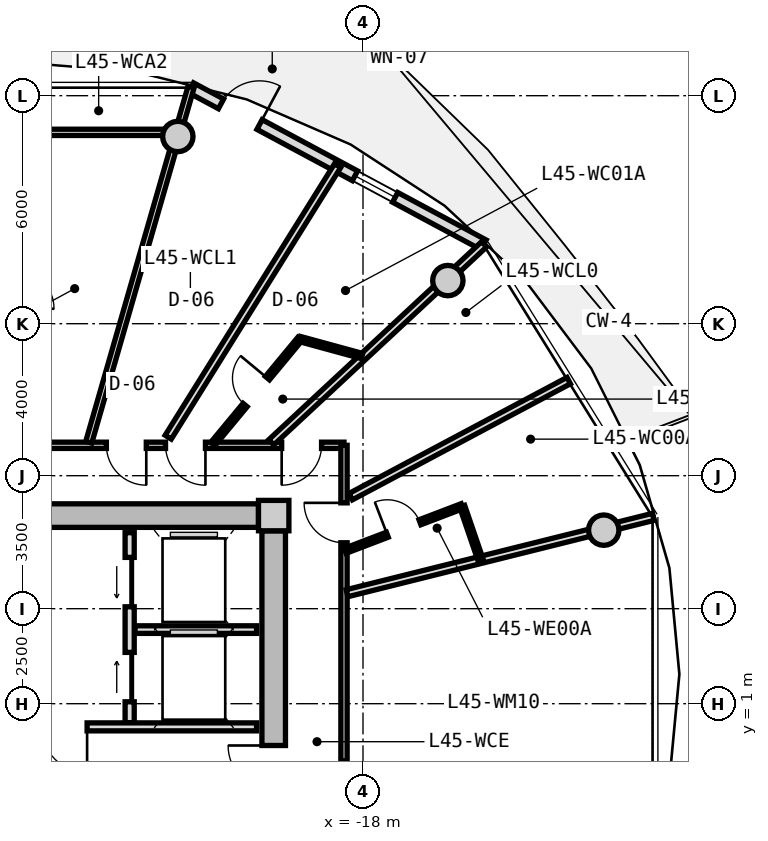
"""IFC4 building model, lengths in metres.
Left out: names, types, materials, properties, quantities, classifications, styles, units other than length and angle.
Written with IfcOpenShell. Run it as: python <this file> out.ifc"""

import sys

from ifc_helpers import new_model, si_unit, direction, frame, frame_2d, origin, origin_2d, place, context, subcontext, project, spatial, rectangle, circle, extrude, source, transform, mapped, element, fill, save


model = new_model("IFC4")
c1 = context("Model", 3, precision=1e-05, world=origin(), true_north=direction((0.0, 1.0)))
c2 = subcontext(c1, "Body", "Model", "MODEL_VIEW")
j1 = project(units=[si_unit("LENGTHUNIT", "METRE"), si_unit("PLANEANGLEUNIT", "RADIAN")], contexts=[c1])
p1 = place(None, origin())
s1 = spatial("IfcSite", under=j1, at=p1, CompositionType="ELEMENT")
p2 = place(p1, origin())
s2 = spatial("IfcBuilding", under=s1, at=p2, CompositionType="ELEMENT")
p3 = place(p2, frame((0.0, 0.0, 146.5)))
s3 = spatial("IfcBuildingStorey", under=s2, at=p3, CompositionType="ELEMENT", Elevation=146.5)
m1 = source(origin(), c2, "Body", "SweptSolid", [
    extrude(rectangle(XDim=0.8, YDim=0.8, at=origin_2d()), origin(), (0.0, 0.0, 1.0), 3.05),
])
p4 = place(p3, frame((-20.35, 5.95, 0.0), z_axis=(0.0, 0.0, 1.0), x_axis=(1.0, 0.0, 0.0)))
e1 = element("IfcColumn", 1, at=p4, inside=s3, PredefinedType="COLUMN", context=c2, shape_type="MappedRepresentation", body=[
    mapped(m1, transform((0.0, 0.0, 0.0), x_axis=(1.0, 0.0, 0.0), y_axis=(0.0, 1.0, 0.0), z_axis=(0.0, 0.0, 1.0), scale=1.0)),
])
m2 = source(origin(), c2, "Body", "SweptSolid", [
    extrude(rectangle(XDim=14.5, YDim=0.62, at=frame_2d((7.25, 0.0))), origin(), (0.0, 0.0, 1.0), 2.81),
])
p5 = place(p3, frame((-35.25, 5.95, 0.0), z_axis=(0.0, 0.0, 1.0), x_axis=(1.0, 0.0, 0.0)))
e2 = element("IfcWall", 2, at=p5, inside=s3, PredefinedType="SHEAR", context=c2, shape_type="MappedRepresentation", body=[
    mapped(m2, transform((0.0, 0.0, 0.0), x_axis=(1.0, 0.0, 0.0), y_axis=(0.0, 1.0, 0.0), z_axis=(0.0, 0.0, 1.0), scale=1.0)),
])
m3 = source(origin(), c2, "Body", "SweptSolid", [
    extrude(rectangle(XDim=11.1, YDim=0.62, at=frame_2d((5.55, 0.0))), origin(), (0.0, 0.0, 1.0), 2.81),
])
p6 = place(p3, frame((-20.35, 5.55, 0.0), z_axis=(0.0, 0.0, 1.0), x_axis=(0.0, -1.0, 0.0)))
e3 = element("IfcWall", 3, at=p6, inside=s3, PredefinedType="SHEAR", context=c2, shape_type="MappedRepresentation", body=[
    mapped(m3, transform((0.0, 0.0, 0.0), x_axis=(1.0, 0.0, 0.0), y_axis=(0.0, 1.0, 0.0), z_axis=(0.0, 0.0, 1.0), scale=1.0)),
])
p7 = place(p6, frame((5.65, 0.0, 0.0)))
e4 = element("IfcOpeningElement", 4, at=p7, cuts=e3, PredefinedType="OPENING", context=c2, shape_type="SweptSolid", body=[
    extrude(rectangle(XDim=1.2, YDim=2.15, at=frame_2d((0.6, 1.075))), frame((0.0, 0.32, 0.0), z_axis=(0.0, -1.0, 0.0), x_axis=(1.0, 0.0, 0.0)), (0.0, 0.0, 1.0), 0.64),
])
m4 = source(origin(), c2, "Body", "SweptSolid", [
    extrude(circle(Radius=0.4, at=origin_2d()), origin(), (0.0, 0.0, 1.0), 3.05),
])
for number, where, z_axis, x_axis in (
    (5, (-11.665, 5.567, 0.0), (0.0, 0.0, 1.0), (1.0, 0.0, 0.0)),
    (6, (-15.767, 12.135, 0.0), (0.0, 0.0, 1.0), (1.0, 0.0, 0.0)),
    (7, (-22.873, 15.926, 0.0), (0.0, 0.0, 1.0), (1.0, 0.0, 0.0)),
):
    element("IfcColumn", number, at=place(p3, frame(where, z_axis=z_axis, x_axis=x_axis)), inside=s3, PredefinedType="COLUMN", context=c2, shape_type="MappedRepresentation", body=[
        mapped(m4, transform((0.0, 0.0, 0.0), x_axis=(1.0, 0.0, 0.0), y_axis=(0.0, 1.0, 0.0), z_axis=(0.0, 0.0, 1.0), scale=1.0)),
    ])
m5 = source(origin(), c2, "Body", "SweptSolid", [
    extrude(rectangle(XDim=8.742, YDim=0.29, at=frame_2d((4.371, 0.0))), origin(), (0.0, 0.0, 1.0), 2.81),
])
p8 = place(p3, frame((-22.529, 17.211, 0.0), z_axis=(0.0, 0.0, 1.0), x_axis=(0.880998740657, -0.473118609823, 0.0)))
e8 = element("IfcWall", 8, at=p8, inside=s3, PredefinedType="SOLIDWALL", context=c2, shape_type="MappedRepresentation", body=[
    mapped(m5, transform((0.0, 0.0, 0.0), x_axis=(1.0, 0.0, 0.0), y_axis=(0.0, 1.0, 0.0), z_axis=(0.0, 0.0, 1.0), scale=1.0)),
])
p9 = place(p8, frame((0.9, 0.0, 0.0)))
e9 = element("IfcOpeningElement", 9, at=p9, cuts=e8, PredefinedType="OPENING", context=c2, shape_type="SweptSolid", body=[
    extrude(rectangle(XDim=1.15, YDim=2.25, at=frame_2d((0.575, 1.125))), frame((0.0, 0.155, 0.0), z_axis=(0.0, -1.0, 0.0), x_axis=(1.0, 0.0, 0.0)), (0.0, 0.0, 1.0), 0.31),
])
p10 = place(p8, frame((4.901, 0.0, 0.85)))
e10 = element("IfcOpeningElement", 10, at=p10, cuts=e8, PredefinedType="OPENING", context=c2, shape_type="SweptSolid", body=[
    extrude(rectangle(XDim=1.2, YDim=1.5, at=frame_2d((0.6, 0.75))), frame((0.0, 0.155, 0.0), z_axis=(0.0, -1.0, 0.0), x_axis=(1.0, 0.0, 0.0)), (0.0, 0.0, 1.0), 0.31),
])
m6 = source(origin(), c2, "Body", "SweptSolid", [
    extrude(rectangle(XDim=5.0, YDim=0.24, at=frame_2d((2.5, 0.0))), origin(), (0.0, 0.0, 1.0), 2.795),
])
p11 = place(p3, frame((-24.14, 0.5, 0.0), z_axis=(0.0, 0.0, 1.0), x_axis=(0.0, 1.0, 0.0)))
e11 = element("IfcWall", 11, at=p11, inside=s3, PredefinedType="PARTITIONING", context=c2, shape_type="MappedRepresentation", body=[
    mapped(m6, transform((0.0, 0.0, 0.0), x_axis=(1.0, 0.0, 0.0), y_axis=(0.0, 1.0, 0.0), z_axis=(0.0, 0.0, 1.0), scale=1.0)),
])
p12 = place(p11, frame((3.05, 0.0, 0.0)))
e12 = element("IfcOpeningElement", 12, at=p12, cuts=e11, PredefinedType="OPENING", context=c2, shape_type="SweptSolid", body=[
    extrude(rectangle(XDim=1.3, YDim=2.2, at=frame_2d((0.65, 1.1))), frame((0.0, 0.13, 0.0), z_axis=(0.0, -1.0, 0.0), x_axis=(1.0, 0.0, 0.0)), (0.0, 0.0, 1.0), 0.26),
])
p13 = place(p11, frame((0.55, 0.0, 0.0)))
e13 = element("IfcOpeningElement", 13, at=p13, cuts=e11, PredefinedType="OPENING", context=c2, shape_type="SweptSolid", body=[
    extrude(rectangle(XDim=1.3, YDim=2.2, at=frame_2d((0.65, 1.1))), frame((0.0, 0.13, 0.0), z_axis=(0.0, -1.0, 0.0), x_axis=(1.0, 0.0, 0.0)), (0.0, 0.0, 1.0), 0.26),
])
m7 = source(origin(), c2, "Body", "SweptSolid", [
    extrude(rectangle(XDim=3.2, YDim=0.2, at=frame_2d((1.6, 0.0))), origin(), (0.0, 0.0, 1.0), 2.795),
])
p14 = place(p3, frame((-24.0, 2.95, 0.0), z_axis=(0.0, 0.0, 1.0), x_axis=(1.0, 0.0, 0.0)))
e14 = element("IfcWall", 14, at=p14, inside=s3, PredefinedType="PARTITIONING", context=c2, shape_type="MappedRepresentation", body=[
    mapped(m7, transform((0.0, 0.0, 0.0), x_axis=(1.0, 0.0, 0.0), y_axis=(0.0, 1.0, 0.0), z_axis=(0.0, 0.0, 1.0), scale=1.0)),
])
m8 = source(origin(), c2, "Body", "SweptSolid", [
    extrude(rectangle(XDim=6.66, YDim=0.21, at=frame_2d((3.33, 0.0))), origin(), (0.0, 0.0, 1.0), 2.795),
])
p15 = place(p3, frame((-27.46, 0.39, 0.0), z_axis=(0.0, 0.0, 1.0), x_axis=(1.0, 0.0, 0.0)))
e15 = element("IfcWall", 15, at=p15, inside=s3, PredefinedType="PARTITIONING", context=c2, shape_type="MappedRepresentation", body=[
    mapped(m8, transform((0.0, 0.0, 0.0), x_axis=(1.0, 0.0, 0.0), y_axis=(0.0, 1.0, 0.0), z_axis=(0.0, 0.0, 1.0), scale=1.0)),
])
p16 = place(p15, frame((1.0, 0.0, 0.0)))
e16 = element("IfcOpeningElement", 16, at=p16, cuts=e15, PredefinedType="OPENING", context=c2, shape_type="SweptSolid", body=[
    extrude(rectangle(XDim=1.2, YDim=2.15, at=frame_2d((0.6, 1.075))), frame((0.0, 0.115, 0.0), z_axis=(0.0, -1.0, 0.0), x_axis=(1.0, 0.0, 0.0)), (0.0, 0.0, 1.0), 0.23),
])
m9 = source(origin(), c2, "Body", "SweptSolid", [
    extrude(rectangle(XDim=8.6, YDim=0.165, at=frame_2d((4.3, 0.0))), origin(), (0.0, 0.0, 1.0), 2.795),
])
p17 = place(p3, frame((-27.1, 7.8, 0.0), z_axis=(0.0, 0.0, 1.0), x_axis=(1.0, 0.0, 0.0)))
e17 = element("IfcWall", 17, at=p17, inside=s3, PredefinedType="PARTITIONING", context=c2, shape_type="MappedRepresentation", body=[
    mapped(m9, transform((0.0, 0.0, 0.0), x_axis=(1.0, 0.0, 0.0), y_axis=(0.0, 1.0, 0.0), z_axis=(0.0, 0.0, 1.0), scale=1.0)),
])
p18 = place(p17, frame((6.96, 0.0, 0.0)))
e18 = element("IfcOpeningElement", 18, at=p18, cuts=e17, PredefinedType="OPENING", context=c2, shape_type="SweptSolid", body=[
    extrude(rectangle(XDim=1.05, YDim=2.15, at=frame_2d((0.525, 1.075))), frame((0.0, 0.093, 0.0), z_axis=(0.0, -1.0, 0.0), x_axis=(1.0, 0.0, 0.0)), (0.0, 0.0, 1.0), 0.185),
])
p19 = place(p17, frame((3.904, 0.0, 0.0)))
e19 = element("IfcOpeningElement", 19, at=p19, cuts=e17, PredefinedType="OPENING", context=c2, shape_type="SweptSolid", body=[
    extrude(rectangle(XDim=1.05, YDim=2.15, at=frame_2d((0.525, 1.075))), frame((0.0, 0.093, 0.0), z_axis=(0.0, -1.0, 0.0), x_axis=(1.0, 0.0, 0.0)), (0.0, 0.0, 1.0), 0.185),
])
p20 = place(p17, frame((2.347, 0.0, 0.0)))
e20 = element("IfcOpeningElement", 20, at=p20, cuts=e17, PredefinedType="OPENING", context=c2, shape_type="SweptSolid", body=[
    extrude(rectangle(XDim=1.05, YDim=2.15, at=frame_2d((0.525, 1.075))), frame((0.0, 0.093, 0.0), z_axis=(0.0, -1.0, 0.0), x_axis=(1.0, 0.0, 0.0)), (0.0, 0.0, 1.0), 0.185),
])
m10 = source(origin(), c2, "Body", "SweptSolid", [
    extrude(rectangle(XDim=15.6, YDim=0.165, at=frame_2d((7.8, 0.0))), origin(), (0.0, 0.0, 1.0), 2.795),
])
p21 = place(p3, frame((-18.5, 7.8, 0.0), z_axis=(0.0, 0.0, 1.0), x_axis=(0.0, -1.0, 0.0)))
e21 = element("IfcWall", 21, at=p21, inside=s3, PredefinedType="PARTITIONING", context=c2, shape_type="MappedRepresentation", body=[
    mapped(m10, transform((0.0, 0.0, 0.0), x_axis=(1.0, 0.0, 0.0), y_axis=(0.0, 1.0, 0.0), z_axis=(0.0, 0.0, 1.0), scale=1.0)),
])
p22 = place(p21, frame((8.314, 0.0, 0.0)))
e22 = element("IfcOpeningElement", 22, at=p22, cuts=e21, PredefinedType="OPENING", context=c2, shape_type="SweptSolid", body=[
    extrude(rectangle(XDim=1.25, YDim=2.2, at=frame_2d((0.625, 1.1))), frame((0.0, 0.093, 0.0), z_axis=(0.0, -1.0, 0.0), x_axis=(1.0, 0.0, 0.0)), (0.0, 0.0, 1.0), 0.185),
])
p23 = place(p21, frame((1.515, 0.0, 0.0)))
e23 = element("IfcOpeningElement", 23, at=p23, cuts=e21, PredefinedType="OPENING", context=c2, shape_type="SweptSolid", body=[
    extrude(rectangle(XDim=1.05, YDim=2.15, at=frame_2d((0.525, 1.075))), frame((0.0, 0.093, 0.0), z_axis=(0.0, -1.0, 0.0), x_axis=(1.0, 0.0, 0.0)), (0.0, 0.0, 1.0), 0.185),
])
m11 = source(origin(), c2, "Body", "SweptSolid", [
    extrude(rectangle(XDim=9.73, YDim=0.165, at=frame_2d((4.865, 0.0))), origin(), (0.0, 0.0, 1.0), 2.345),
])
p24 = place(p3, frame((-25.217, 7.88, 0.0), z_axis=(0.0, 0.0, 1.0), x_axis=(0.27679492614, 0.960929013436, 0.0)))
e24 = element("IfcWall", 24, at=p24, inside=s3, PredefinedType="PARTITIONING", context=c2, shape_type="MappedRepresentation", body=[
    mapped(m11, transform((0.0, 0.0, 0.0), x_axis=(1.0, 0.0, 0.0), y_axis=(0.0, 1.0, 0.0), z_axis=(0.0, 0.0, 1.0), scale=1.0)),
])
m12 = source(origin(), c2, "Body", "SweptSolid", [
    extrude(rectangle(XDim=4.469, YDim=0.165, at=frame_2d((2.234, 0.0))), origin(), (0.0, 0.0, 1.0), 2.345),
])
p25 = place(p3, frame((-27.18, 16.035, 0.0), z_axis=(0.0, 0.0, 1.0), x_axis=(1.0, 0.0, 0.0)))
e25 = element("IfcWall", 25, at=p25, inside=s3, PredefinedType="PARTITIONING", context=c2, shape_type="MappedRepresentation", body=[
    mapped(m12, transform((0.0, 0.0, 0.0), x_axis=(1.0, 0.0, 0.0), y_axis=(0.0, 1.0, 0.0), z_axis=(0.0, 0.0, 1.0), scale=1.0)),
])
m13 = source(origin(), c2, "Body", "SweptSolid", [
    extrude(rectangle(XDim=8.305, YDim=0.19, at=frame_2d((4.153, 0.0))), origin(), (0.0, 0.0, 1.0), 2.345),
])
p26 = place(p3, frame((-18.42, 3.908, 0.0), z_axis=(0.0, 0.0, 1.0), x_axis=(0.970309994378, 0.241864662175, 0.0)))
e26 = element("IfcWall", 26, at=p26, inside=s3, PredefinedType="PARTITIONING", context=c2, shape_type="MappedRepresentation", body=[
    mapped(m13, transform((0.0, 0.0, 0.0), x_axis=(1.0, 0.0, 0.0), y_axis=(0.0, 1.0, 0.0), z_axis=(0.0, 0.0, 1.0), scale=1.0)),
])
m14 = source(origin(), c2, "Body", "SweptSolid", [
    extrude(rectangle(XDim=7.648, YDim=0.19, at=frame_2d((3.824, 0.0))), origin(), (0.0, 0.0, 1.0), 2.345),
])
p27 = place(p3, frame((-20.413, 7.88, 0.0), z_axis=(0.0, 0.0, 1.0), x_axis=(0.732182665826, 0.681108320213, 0.0)))
e27 = element("IfcWall", 27, at=p27, inside=s3, PredefinedType="PARTITIONING", context=c2, shape_type="MappedRepresentation", body=[
    mapped(m14, transform((0.0, 0.0, 0.0), x_axis=(1.0, 0.0, 0.0), y_axis=(0.0, 1.0, 0.0), z_axis=(0.0, 0.0, 1.0), scale=1.0)),
])
m15 = source(origin(), c2, "Body", "SweptSolid", [
    extrude(rectangle(XDim=6.499, YDim=0.19, at=frame_2d((3.25, 0.0))), origin(), (0.0, 0.0, 1.0), 2.795),
])
p28 = place(p3, frame((-18.324, 6.449, 0.0), z_axis=(0.0, 0.0, 1.0), x_axis=(0.882715595921, 0.469907625729, 0.0)))
e28 = element("IfcWall", 28, at=p28, inside=s3, PredefinedType="PARTITIONING", context=c2, shape_type="MappedRepresentation", body=[
    mapped(m15, transform((0.0, 0.0, 0.0), x_axis=(1.0, 0.0, 0.0), y_axis=(0.0, 1.0, 0.0), z_axis=(0.0, 0.0, 1.0), scale=1.0)),
])
m16 = source(origin(), c2, "Body", "SweptSolid", [
    extrude(rectangle(XDim=3.295, YDim=0.14, at=frame_2d((1.647, 0.0))), origin(), (0.0, 0.0, 1.0), 2.795),
])
p29 = place(p3, frame((-18.47, 5.023, 0.0), z_axis=(0.0, 0.0, 1.0), x_axis=(0.934202224769, 0.356743890258, 0.0)))
e29 = element("IfcWall", 29, at=p29, inside=s3, PredefinedType="PARTITIONING", context=c2, shape_type="MappedRepresentation", body=[
    mapped(m16, transform((0.0, 0.0, 0.0), x_axis=(1.0, 0.0, 0.0), y_axis=(0.0, 1.0, 0.0), z_axis=(0.0, 0.0, 1.0), scale=1.0)),
])
p30 = place(p29, frame((1.188, 0.0, 0.0)))
e30 = element("IfcOpeningElement", 30, at=p30, cuts=e29, PredefinedType="OPENING", context=c2, shape_type="SweptSolid", body=[
    extrude(rectangle(XDim=0.92, YDim=2.1, at=frame_2d((0.46, 1.05))), frame((0.0, 0.08, 0.0), z_axis=(0.0, -1.0, 0.0), x_axis=(1.0, 0.0, 0.0)), (0.0, 0.0, 1.0), 0.16),
])
m17 = source(origin(), c2, "Body", "SweptSolid", [
    extrude(rectangle(XDim=1.479, YDim=0.14, at=frame_2d((0.739, 0.0))), origin(), (0.0, 0.0, 1.0), 2.795),
])
p31 = place(p3, frame((-15.392, 6.198, 0.0), z_axis=(0.0, 0.0, 1.0), x_axis=(0.324438293903, -0.945906862989, 0.0)))
e31 = element("IfcWall", 31, at=p31, inside=s3, PredefinedType="PARTITIONING", context=c2, shape_type="MappedRepresentation", body=[
    mapped(m17, transform((0.0, 0.0, 0.0), x_axis=(1.0, 0.0, 0.0), y_axis=(0.0, 1.0, 0.0), z_axis=(0.0, 0.0, 1.0), scale=1.0)),
])
m18 = source(origin(), c2, "Body", "SweptSolid", [
    extrude(rectangle(XDim=8.422, YDim=0.19, at=frame_2d((4.211, 0.0))), origin(), (0.0, 0.0, 1.0), 2.795),
])
p32 = place(p3, frame((-23.125, 8.014, 0.0), z_axis=(0.0, 0.0, 1.0), x_axis=(0.52925352896, 0.848463730565, 0.0)))
e32 = element("IfcWall", 32, at=p32, inside=s3, PredefinedType="PARTITIONING", context=c2, shape_type="MappedRepresentation", body=[
    mapped(m18, transform((0.0, 0.0, 0.0), x_axis=(1.0, 0.0, 0.0), y_axis=(0.0, 1.0, 0.0), z_axis=(0.0, 0.0, 1.0), scale=1.0)),
])
m19 = source(origin(), c2, "Body", "SweptSolid", [
    extrude(rectangle(XDim=3.593, YDim=0.14, at=frame_2d((1.797, 0.0))), origin(), (0.0, 0.0, 1.0), 2.795),
])
p33 = place(p3, frame((-21.955, 7.83, 0.0), z_axis=(0.0, 0.0, 1.0), x_axis=(0.638271060163, 0.769811700196, 0.0)))
e33 = element("IfcWall", 33, at=p33, inside=s3, PredefinedType="PARTITIONING", context=c2, shape_type="MappedRepresentation", body=[
    mapped(m19, transform((0.0, 0.0, 0.0), x_axis=(1.0, 0.0, 0.0), y_axis=(0.0, 1.0, 0.0), z_axis=(0.0, 0.0, 1.0), scale=1.0)),
])
p34 = place(p33, frame((1.337, 0.0, 0.0)))
e34 = element("IfcOpeningElement", 34, at=p34, cuts=e33, PredefinedType="OPENING", context=c2, shape_type="SweptSolid", body=[
    extrude(rectangle(XDim=0.92, YDim=2.1, at=frame_2d((0.46, 1.05))), frame((0.0, 0.08, 0.0), z_axis=(0.0, -1.0, 0.0), x_axis=(1.0, 0.0, 0.0)), (0.0, 0.0, 1.0), 0.16),
])
m20 = source(origin(), c2, "Body", "SweptSolid", [
    extrude(rectangle(XDim=1.697, YDim=0.14, at=frame_2d((0.848, 0.0))), origin(), (0.0, 0.0, 1.0), 2.795),
])
p35 = place(p3, frame((-19.662, 10.596, 0.0), z_axis=(0.0, 0.0, 1.0), x_axis=(0.964667458123, -0.263470482671, 0.0)))
e35 = element("IfcWall", 35, at=p35, inside=s3, PredefinedType="PARTITIONING", context=c2, shape_type="MappedRepresentation", body=[
    mapped(m20, transform((0.0, 0.0, 0.0), x_axis=(1.0, 0.0, 0.0), y_axis=(0.0, 1.0, 0.0), z_axis=(0.0, 0.0, 1.0), scale=1.0)),
])
m21 = source(origin(), c2, "Body", "SweptSolid", [
    extrude(rectangle(XDim=1.15, YDim=2.25, at=frame_2d((0.575, 1.125))), frame((0.0, 0.025, 0.0), z_axis=(0.0, -1.0, 0.0), x_axis=(1.0, 0.0, 0.0)), (0.0, 0.0, 1.0), 0.05),
])
p36 = place(p9, origin())
e36 = element("IfcDoor", 36, at=p36, inside=s3, OperationType="SINGLE_SWING_RIGHT", PredefinedType="DOOR", context=c2, shape_type="MappedRepresentation", body=[
    mapped(m21, transform((0.0, 0.0, 0.0), x_axis=(1.0, 0.0, 0.0), y_axis=(0.0, 1.0, 0.0), z_axis=(0.0, 0.0, 1.0), scale=1.0)),
])
fill(e9, e36)
m22 = source(origin(), c2, "Body", "SweptSolid", [
    extrude(rectangle(XDim=1.2, YDim=1.5, at=frame_2d((0.6, 0.75))), frame((0.0, 0.03, 0.0), z_axis=(0.0, -1.0, 0.0), x_axis=(1.0, 0.0, 0.0)), (0.0, 0.0, 1.0), 0.06),
])
p37 = place(p10, origin())
e37 = element("IfcWindow", 37, at=p37, inside=s3, PartitioningType="SINGLE_PANEL", PredefinedType="WINDOW", context=c2, shape_type="MappedRepresentation", body=[
    mapped(m22, transform((0.0, 0.0, 0.0), x_axis=(1.0, 0.0, 0.0), y_axis=(0.0, 1.0, 0.0), z_axis=(0.0, 0.0, 1.0), scale=1.0)),
])
fill(e10, e37)
m23 = source(origin(), c2, "Body", "SweptSolid", [
    extrude(rectangle(XDim=1.3, YDim=2.2, at=frame_2d((0.65, 1.1))), frame((0.0, 0.025, 0.0), z_axis=(0.0, -1.0, 0.0), x_axis=(1.0, 0.0, 0.0)), (0.0, 0.0, 1.0), 0.05),
])
p38 = place(p12, origin())
e38 = element("IfcDoor", 38, at=p38, inside=s3, OperationType="SLIDING_TO_LEFT", PredefinedType="DOOR", context=c2, shape_type="MappedRepresentation", body=[
    mapped(m23, transform((0.0, 0.0, 0.0), x_axis=(1.0, 0.0, 0.0), y_axis=(0.0, 1.0, 0.0), z_axis=(0.0, 0.0, 1.0), scale=1.0)),
])
fill(e12, e38)
p39 = place(p13, origin())
e39 = element("IfcDoor", 39, at=p39, inside=s3, OperationType="SLIDING_TO_RIGHT", PredefinedType="DOOR", context=c2, shape_type="MappedRepresentation", body=[
    mapped(m23, transform((0.0, 0.0, 0.0), x_axis=(1.0, 0.0, 0.0), y_axis=(0.0, 1.0, 0.0), z_axis=(0.0, 0.0, 1.0), scale=1.0)),
])
fill(e13, e39)
m24 = source(origin(), c2, "Body", "SweptSolid", [
    extrude(rectangle(XDim=1.2, YDim=2.15, at=frame_2d((0.6, 1.075))), frame((0.0, 0.025, 0.0), z_axis=(0.0, -1.0, 0.0), x_axis=(1.0, 0.0, 0.0)), (0.0, 0.0, 1.0), 0.05),
])
p40 = place(p16, frame((1.2, 0.0, 0.0), z_axis=(0.0, 0.0, 1.0), x_axis=(-1.0, 0.0, 0.0)))
e40 = element("IfcDoor", 40, at=p40, inside=s3, OperationType="SINGLE_SWING_LEFT", PredefinedType="DOOR", context=c2, shape_type="MappedRepresentation", body=[
    mapped(m24, transform((0.0, 0.0, 0.0), x_axis=(1.0, 0.0, 0.0), y_axis=(0.0, 1.0, 0.0), z_axis=(0.0, 0.0, 1.0), scale=1.0)),
])
fill(e16, e40)
p41 = place(p7, frame((1.2, 0.0, 0.0), z_axis=(0.0, 0.0, 1.0), x_axis=(-1.0, 0.0, 0.0)))
e41 = element("IfcDoor", 41, at=p41, inside=s3, OperationType="SINGLE_SWING_RIGHT", PredefinedType="DOOR", context=c2, shape_type="MappedRepresentation", body=[
    mapped(m24, transform((0.0, 0.0, 0.0), x_axis=(1.0, 0.0, 0.0), y_axis=(0.0, 1.0, 0.0), z_axis=(0.0, 0.0, 1.0), scale=1.0)),
])
fill(e4, e41)
m25 = source(origin(), c2, "Body", "SweptSolid", [
    extrude(rectangle(XDim=1.05, YDim=2.15, at=frame_2d((0.525, 1.075))), frame((0.0, 0.025, 0.0), z_axis=(0.0, -1.0, 0.0), x_axis=(1.0, 0.0, 0.0)), (0.0, 0.0, 1.0), 0.05),
])
p42 = place(p23, frame((1.05, 0.0, 0.0), z_axis=(0.0, 0.0, 1.0), x_axis=(-1.0, 0.0, 0.0)))
e42 = element("IfcDoor", 42, at=p42, inside=s3, OperationType="SINGLE_SWING_RIGHT", PredefinedType="DOOR", context=c2, shape_type="MappedRepresentation", body=[
    mapped(m25, transform((0.0, 0.0, 0.0), x_axis=(1.0, 0.0, 0.0), y_axis=(0.0, 1.0, 0.0), z_axis=(0.0, 0.0, 1.0), scale=1.0)),
])
fill(e23, e42)
m26 = source(origin(), c2, "Body", "SweptSolid", [
    extrude(rectangle(XDim=0.92, YDim=2.1, at=frame_2d((0.46, 1.05))), frame((0.0, 0.025, 0.0), z_axis=(0.0, -1.0, 0.0), x_axis=(1.0, 0.0, 0.0)), (0.0, 0.0, 1.0), 0.05),
])
p43 = place(p30, origin())
e43 = element("IfcDoor", 43, at=p43, inside=s3, OperationType="SINGLE_SWING_LEFT", PredefinedType="DOOR", context=c2, shape_type="MappedRepresentation", body=[
    mapped(m26, transform((0.0, 0.0, 0.0), x_axis=(1.0, 0.0, 0.0), y_axis=(0.0, 1.0, 0.0), z_axis=(0.0, 0.0, 1.0), scale=1.0)),
])
fill(e30, e43)
p44 = place(p18, frame((1.05, 0.0, 0.0), z_axis=(0.0, 0.0, 1.0), x_axis=(-1.0, 0.0, 0.0)))
e44 = element("IfcDoor", 44, at=p44, inside=s3, OperationType="SINGLE_SWING_RIGHT", PredefinedType="DOOR", context=c2, shape_type="MappedRepresentation", body=[
    mapped(m25, transform((0.0, 0.0, 0.0), x_axis=(1.0, 0.0, 0.0), y_axis=(0.0, 1.0, 0.0), z_axis=(0.0, 0.0, 1.0), scale=1.0)),
])
fill(e18, e44)
p45 = place(p19, frame((1.05, 0.0, 0.0), z_axis=(0.0, 0.0, 1.0), x_axis=(-1.0, 0.0, 0.0)))
e45 = element("IfcDoor", 45, at=p45, inside=s3, OperationType="SINGLE_SWING_LEFT", PredefinedType="DOOR", context=c2, shape_type="MappedRepresentation", body=[
    mapped(m25, transform((0.0, 0.0, 0.0), x_axis=(1.0, 0.0, 0.0), y_axis=(0.0, 1.0, 0.0), z_axis=(0.0, 0.0, 1.0), scale=1.0)),
])
fill(e19, e45)
p46 = place(p34, origin())
e46 = element("IfcDoor", 46, at=p46, inside=s3, OperationType="SINGLE_SWING_RIGHT", PredefinedType="DOOR", context=c2, shape_type="MappedRepresentation", body=[
    mapped(m26, transform((0.0, 0.0, 0.0), x_axis=(1.0, 0.0, 0.0), y_axis=(0.0, 1.0, 0.0), z_axis=(0.0, 0.0, 1.0), scale=1.0)),
])
fill(e34, e46)
p47 = place(p20, frame((1.05, 0.0, 0.0), z_axis=(0.0, 0.0, 1.0), x_axis=(-1.0, 0.0, 0.0)))
e47 = element("IfcDoor", 47, at=p47, inside=s3, OperationType="SINGLE_SWING_LEFT", PredefinedType="DOOR", context=c2, shape_type="MappedRepresentation", body=[
    mapped(m25, transform((0.0, 0.0, 0.0), x_axis=(1.0, 0.0, 0.0), y_axis=(0.0, 1.0, 0.0), z_axis=(0.0, 0.0, 1.0), scale=1.0)),
])
fill(e20, e47)
save(model, sys.argv[1])
